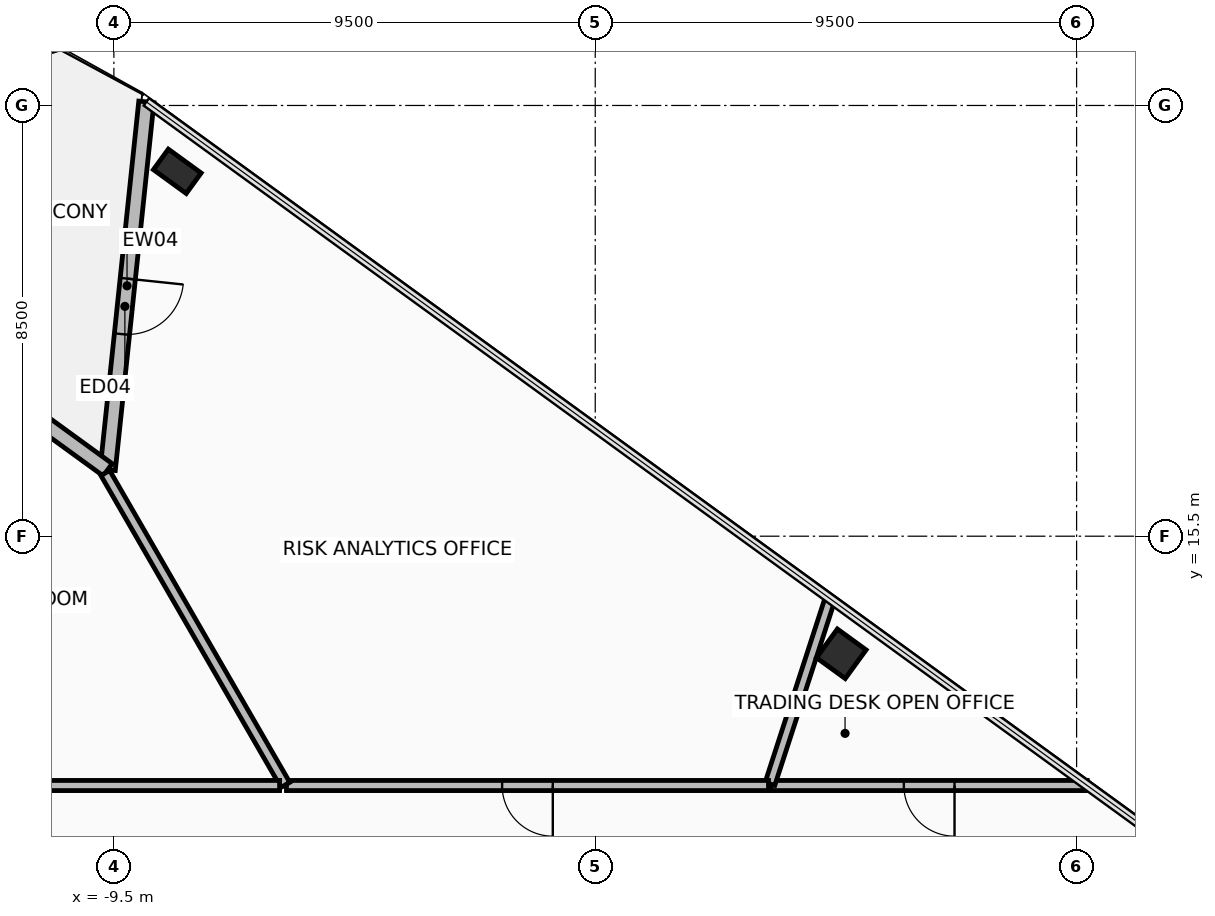
"""IFC4 building model, lengths in metres.
Left out: names, types, materials, properties, quantities, classifications, styles, units other than length and angle.
Written with IfcOpenShell. Run it as: python <this file> out.ifc"""

import sys

from ifc_helpers import new_model, si_unit, direction, frame, frame_2d, origin, origin_2d, place, context, subcontext, project, spatial, rectangle, hollow_rectangle, extrude, element, fill, save


model = new_model("IFC4")
c1 = context("Model", 3, precision=1e-05, world=origin(), true_north=direction((0.0, 1.0)))
c2 = subcontext(c1, "Body", "Model", "MODEL_VIEW")
j1 = project(units=[si_unit("LENGTHUNIT", "METRE"), si_unit("PLANEANGLEUNIT", "RADIAN")], contexts=[c1])
p1 = place(None, origin())
s1 = spatial("IfcSite", under=j1, at=p1, CompositionType="ELEMENT")
p2 = place(p1, origin())
s2 = spatial("IfcBuilding", under=s1, at=p2, CompositionType="ELEMENT")
p3 = place(p2, frame((0.0, 0.0, 126.85)))
s3 = spatial("IfcBuildingStorey", under=s2, at=p3, CompositionType="ELEMENT", Elevation=126.85)
p4 = place(p3, frame((4.856, 13.179, 0.0), z_axis=(0.0, 0.0, 1.0), x_axis=(-0.809016994375, 0.587785252292, 0.0)))
e1 = element("IfcColumn", 1, at=p4, inside=s3, PredefinedType="COLUMN", context=c2, shape_type="SweptSolid", body=[
    extrude(hollow_rectangle(XDim=0.7, YDim=0.7, WallThickness=0.04, at=origin_2d()), origin(), (0.0, 0.0, 1.0), 3.6),
])
p5 = place(p3, frame((-8.249, 22.701, 0.0), z_axis=(0.0, 0.0, 1.0), x_axis=(-0.809016994375, 0.587785252292, 0.0)))
e2 = element("IfcColumn", 2, at=p5, inside=s3, PredefinedType="COLUMN", context=c2, shape_type="SweptSolid", body=[
    extrude(hollow_rectangle(XDim=0.5, YDim=0.8, WallThickness=0.04, at=origin_2d()), origin(), (0.0, 0.0, 1.0), 3.6),
])
p6 = place(p3, frame((-8.859, 24.071, 0.0), z_axis=(0.0, 0.0, 1.0), x_axis=(-0.104512431924, -0.9945235802, 0.0)))
e3 = element("IfcWall", 3, at=p6, inside=s3, PredefinedType="STANDARD", context=c2, shape_type="SweptSolid", body=[
    extrude(rectangle(XDim=7.3, YDim=0.3, at=frame_2d((3.65, 0.0))), origin(), (0.0, 0.0, 1.0), 2.705),
])
p7 = place(p6, frame((3.508, 0.0, 0.0)))
e4 = element("IfcOpeningElement", 4, at=p7, cuts=e3, PredefinedType="OPENING", context=c2, shape_type="SweptSolid", body=[
    extrude(rectangle(XDim=1.1, YDim=2.2, at=frame_2d((0.55, 1.1))), frame((0.0, 0.16, 0.0), z_axis=(0.0, -1.0, 0.0), x_axis=(1.0, 0.0, 0.0)), (0.0, 0.0, 1.0), 0.32),
])
p8 = place(p3, frame((-9.622, 16.811, 0.0), z_axis=(0.0, 0.0, 1.0), x_axis=(-0.809002104592, 0.587805745775, 0.0)))
e5 = element("IfcWall", 5, at=p8, inside=s3, PredefinedType="STANDARD", context=c2, shape_type="SweptSolid", body=[
    extrude(rectangle(XDim=7.3, YDim=0.3, at=frame_2d((3.65, 0.0))), origin(), (0.0, 0.0, 1.0), 2.705),
])
p9 = place(p8, frame((2.85, 0.0, 0.325)))
e6 = element("IfcOpeningElement", 6, at=p9, cuts=e5, PredefinedType="OPENING", context=c2, shape_type="SweptSolid", body=[
    extrude(rectangle(XDim=1.6, YDim=2.2, at=frame_2d((0.8, 1.1))), frame((0.0, 0.16, 0.0), z_axis=(0.0, -1.0, 0.0), x_axis=(1.0, 0.0, 0.0)), (0.0, 0.0, 1.0), 0.32),
])
p10 = place(p3, frame((9.71, 10.58, 0.0), z_axis=(0.0, 0.0, 1.0), x_axis=(-1.0, 0.0, 0.0)))
e7 = element("IfcWall", 7, at=p10, inside=s3, PredefinedType="PARTITIONING", context=c2, shape_type="SweptSolid", body=[
    extrude(rectangle(XDim=6.238, YDim=0.2, at=frame_2d((3.119, 0.0))), origin(), (0.0, 0.0, 1.0), 2.705),
])
p11 = place(p10, frame((2.619, 0.0, 0.0)))
e8 = element("IfcOpeningElement", 8, at=p11, cuts=e7, PredefinedType="OPENING", context=c2, shape_type="SweptSolid", body=[
    extrude(rectangle(XDim=1.0, YDim=2.15, at=frame_2d((0.5, 1.075))), frame((0.0, 0.11, 0.0), z_axis=(0.0, -1.0, 0.0), x_axis=(1.0, 0.0, 0.0)), (0.0, 0.0, 1.0), 0.22),
])
p12 = place(p3, frame((3.448, 10.613, 0.0), z_axis=(0.0, 0.0, 1.0), x_axis=(0.309031469119, 0.951051813044, 0.0)))
e9 = element("IfcWall", 9, at=p12, inside=s3, PredefinedType="PARTITIONING", context=c2, shape_type="SweptSolid", body=[
    extrude(rectangle(XDim=3.842, YDim=0.2, at=frame_2d((1.921, 0.0))), origin(), (0.0, 0.0, 1.0), 2.705),
])
p13 = place(p3, frame((3.419, 10.58, 0.0), z_axis=(0.0, 0.0, 1.0), x_axis=(-1.0, 0.0, 0.0)))
e10 = element("IfcWall", 10, at=p13, inside=s3, PredefinedType="PARTITIONING", context=c2, shape_type="SweptSolid", body=[
    extrude(rectangle(XDim=9.513, YDim=0.2, at=frame_2d((4.757, 0.0))), origin(), (0.0, 0.0, 1.0), 3.045),
])
p14 = place(p13, frame((4.257, 0.0, 0.0)))
e11 = element("IfcOpeningElement", 11, at=p14, cuts=e10, PredefinedType="OPENING", context=c2, shape_type="SweptSolid", body=[
    extrude(rectangle(XDim=1.0, YDim=2.15, at=frame_2d((0.5, 1.075))), frame((0.0, 0.11, 0.0), z_axis=(0.0, -1.0, 0.0), x_axis=(1.0, 0.0, 0.0)), (0.0, 0.0, 1.0), 0.22),
])
p15 = place(p3, frame((-6.115, 10.593, 0.0), z_axis=(0.0, 0.0, 1.0), x_axis=(-0.50001885532, 0.866014517387, 0.0)))
e12 = element("IfcWall", 12, at=p15, inside=s3, PredefinedType="PARTITIONING", context=c2, shape_type="SweptSolid", body=[
    extrude(rectangle(XDim=7.106, YDim=0.2, at=frame_2d((3.553, 0.0))), origin(), (0.0, 0.0, 1.0), 2.855),
])
p16 = place(p3, frame((-6.229, 10.58, 0.0), z_axis=(0.0, 0.0, 1.0), x_axis=(-1.0, 0.0, 0.0)))
e13 = element("IfcWall", 13, at=p16, inside=s3, PredefinedType="PARTITIONING", context=c2, shape_type="SweptSolid", body=[
    extrude(rectangle(XDim=5.65, YDim=0.2, at=frame_2d((2.825, 0.0))), origin(), (0.0, 0.0, 1.0), 2.755),
])
p17 = place(p7, origin())
e14 = element("IfcDoor", 14, at=p17, inside=s3, OperationType="SINGLE_SWING_LEFT", PredefinedType="DOOR", context=c2, shape_type="SweptSolid", body=[
    extrude(rectangle(XDim=1.1, YDim=2.2, at=frame_2d((0.55, 1.1))), frame((0.0, 0.025, 0.0), z_axis=(0.0, -1.0, 0.0), x_axis=(1.0, 0.0, 0.0)), (0.0, 0.0, 1.0), 0.05),
])
fill(e4, e14)
p18 = place(p11, origin())
e15 = element("IfcDoor", 15, at=p18, inside=s3, OperationType="SINGLE_SWING_RIGHT", PredefinedType="DOOR", context=c2, shape_type="SweptSolid", body=[
    extrude(rectangle(XDim=1.0, YDim=2.15, at=frame_2d((0.5, 1.075))), frame((0.0, 0.025, 0.0), z_axis=(0.0, -1.0, 0.0), x_axis=(1.0, 0.0, 0.0)), (0.0, 0.0, 1.0), 0.05),
])
fill(e8, e15)
p19 = place(p14, origin())
e16 = element("IfcDoor", 16, at=p19, inside=s3, OperationType="SINGLE_SWING_RIGHT", PredefinedType="DOOR", context=c2, shape_type="SweptSolid", body=[
    extrude(rectangle(XDim=1.0, YDim=2.15, at=frame_2d((0.5, 1.075))), frame((0.0, 0.025, 0.0), z_axis=(0.0, -1.0, 0.0), x_axis=(1.0, 0.0, 0.0)), (0.0, 0.0, 1.0), 0.05),
])
fill(e11, e16)
save(model, sys.argv[1])
